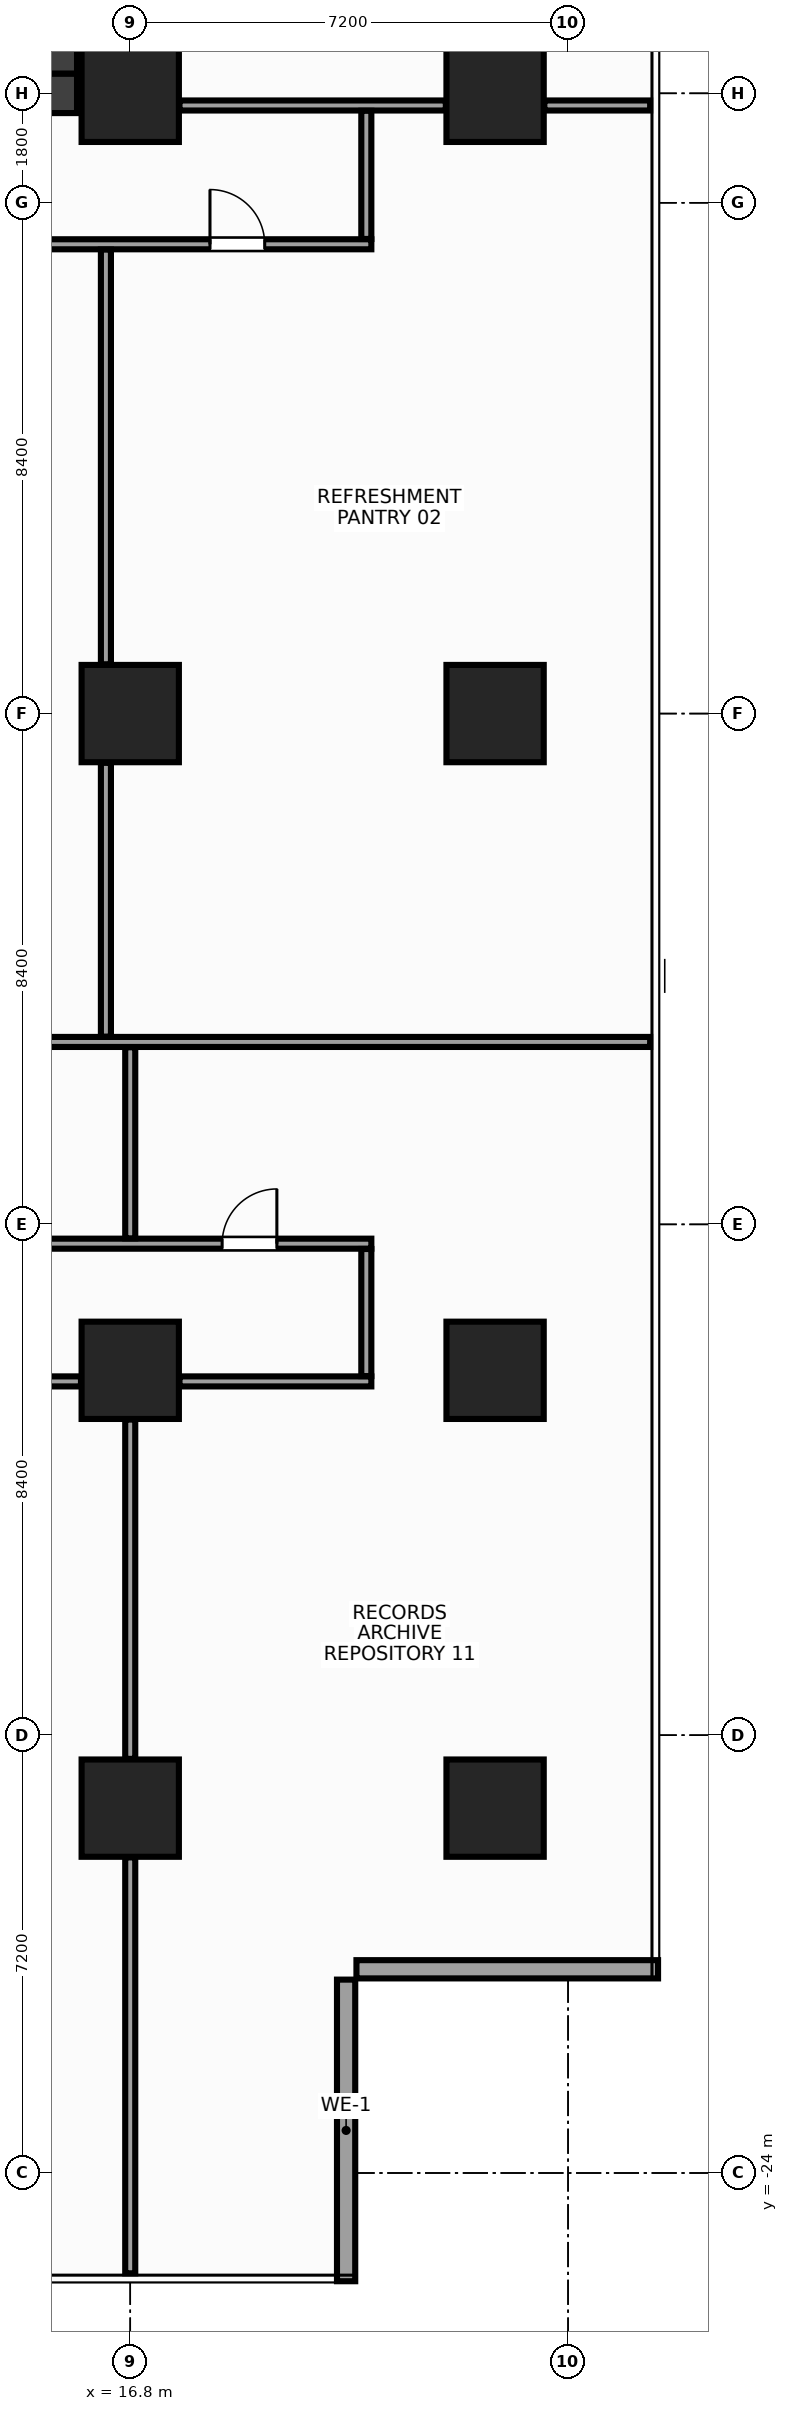
"""IFC4 building model, lengths in metres.
Left out: names, types, materials, properties, quantities, classifications, styles, units other than length and angle.
Written with IfcOpenShell. Run it as: python <this file> out.ifc"""

import sys

from ifc_helpers import new_model, si_unit, direction, frame, frame_2d, origin, origin_2d, place, context, subcontext, project, spatial, rectangle, extrude, source, transform, mapped, element, fill, save


model = new_model("IFC4")
c1 = context("Model", 3, precision=1e-05, world=origin(), true_north=direction((0.0, 1.0)))
c2 = subcontext(c1, "Body", "Model", "MODEL_VIEW")
j1 = project(units=[si_unit("LENGTHUNIT", "METRE"), si_unit("PLANEANGLEUNIT", "RADIAN")], contexts=[c1])
p1 = place(None, origin())
s1 = spatial("IfcSite", under=j1, at=p1, CompositionType="ELEMENT")
p2 = place(p1, origin())
s2 = spatial("IfcBuilding", under=s1, at=p2, CompositionType="ELEMENT")
p3 = place(p2, frame((0.0, 0.0, 110.0)))
s3 = spatial("IfcBuildingStorey", under=s2, at=p3, CompositionType="ELEMENT", Elevation=110.0)
m1 = source(origin(), c2, "Body", "SweptSolid", [
    extrude(rectangle(XDim=31.85, YDim=0.65, at=frame_2d((15.925, 0.0))), origin(), (0.0, 0.0, 1.0), 3.6),
])
p4 = place(p3, frame((-15.925, 10.2, 0.0), z_axis=(0.0, 0.0, 1.0), x_axis=(1.0, 0.0, 0.0)))
e1 = element("IfcWall", 1, at=p4, inside=s3, PredefinedType="SHEAR", context=c2, shape_type="MappedRepresentation", body=[
    mapped(m1, transform((0.0, 0.0, 0.0), x_axis=(1.0, 0.0, 0.0), y_axis=(0.0, 1.0, 0.0), z_axis=(0.0, 0.0, 1.0), scale=1.0)),
])
p5 = place(p4, frame((1.775, 0.0, 0.0)))
e2 = element("IfcOpeningElement", 2, at=p5, cuts=e1, PredefinedType="OPENING", context=c2, shape_type="SweptSolid", body=[
    extrude(rectangle(XDim=1.6, YDim=2.15, at=frame_2d((0.8, 1.075))), frame((0.0, 0.337, 0.0), z_axis=(0.0, -1.0, 0.0), x_axis=(1.0, 0.0, 0.0)), (0.0, 0.0, 1.0), 0.674),
])
p6 = place(p4, frame((28.475, 0.0, 0.0)))
e3 = element("IfcOpeningElement", 3, at=p6, cuts=e1, PredefinedType="OPENING", context=c2, shape_type="SweptSolid", body=[
    extrude(rectangle(XDim=1.6, YDim=2.15, at=frame_2d((0.8, 1.075))), frame((0.0, 0.337, 0.0), z_axis=(0.0, -1.0, 0.0), x_axis=(1.0, 0.0, 0.0)), (0.0, 0.0, 1.0), 0.674),
])
p7 = place(p4, frame((15.175, 0.0, 0.0)))
e4 = element("IfcOpeningElement", 4, at=p7, cuts=e1, PredefinedType="OPENING", context=c2, shape_type="SweptSolid", body=[
    extrude(rectangle(XDim=1.5, YDim=2.2, at=frame_2d((0.75, 1.1))), frame((0.0, 0.337, 0.0), z_axis=(0.0, -1.0, 0.0), x_axis=(1.0, 0.0, 0.0)), (0.0, 0.0, 1.0), 0.674),
])
m2 = source(origin(), c2, "Body", "SweptSolid", [
    extrude(rectangle(XDim=12.95, YDim=0.65, at=frame_2d((6.475, 0.0))), origin(), (0.0, 0.0, 1.0), 3.6),
])
p8 = place(p3, frame((15.6, 10.525, 0.0), z_axis=(0.0, 0.0, 1.0), x_axis=(0.0, 1.0, 0.0)))
e5 = element("IfcWall", 5, at=p8, inside=s3, PredefinedType="SHEAR", context=c2, shape_type="MappedRepresentation", body=[
    mapped(m2, transform((0.0, 0.0, 0.0), x_axis=(1.0, 0.0, 0.0), y_axis=(0.0, 1.0, 0.0), z_axis=(0.0, 0.0, 1.0), scale=1.0)),
])
m3 = source(origin(), c2, "Body", "SweptSolid", [
    extrude(rectangle(XDim=1.6, YDim=1.6, at=origin_2d()), origin(), (0.0, 0.0, 1.0), 3.6),
])
for number, where, z_axis, x_axis in (
    (6, (16.8, -18.0, 0.0), (0.0, 0.0, 1.0), (1.0, 0.0, 0.0)),
    (7, (16.8, -10.8, 0.0), (0.0, 0.0, 1.0), (1.0, 0.0, 0.0)),
    (8, (16.8, 0.0, 0.0), (0.0, 0.0, 1.0), (1.0, 0.0, 0.0)),
    (9, (16.8, 10.2, 0.0), (0.0, 0.0, 1.0), (1.0, 0.0, 0.0)),
    (10, (22.8, -18.0, 0.0), (0.0, 0.0, 1.0), (1.0, 0.0, 0.0)),
    (11, (22.8, -10.8, 0.0), (0.0, 0.0, 1.0), (1.0, 0.0, 0.0)),
    (12, (22.8, 0.0, 0.0), (0.0, 0.0, 1.0), (1.0, 0.0, 0.0)),
    (13, (22.8, 10.2, 0.0), (0.0, 0.0, 1.0), (1.0, 0.0, 0.0)),
):
    element("IfcColumn", number, at=place(p3, frame(where, z_axis=z_axis, x_axis=x_axis)), inside=s3, PredefinedType="COLUMN", context=c2, shape_type="MappedRepresentation", body=[
        mapped(m3, transform((0.0, 0.0, 0.0), x_axis=(1.0, 0.0, 0.0), y_axis=(0.0, 1.0, 0.0), z_axis=(0.0, 0.0, 1.0), scale=1.0)),
    ])
m4 = source(origin(), c2, "Body", "SweptSolid", [
    extrude(rectangle(XDim=4.96, YDim=0.3, at=frame_2d((2.48, 0.0))), origin(), (0.0, 0.0, 1.0), 2.74),
])
for number, where, z_axis, x_axis in (
    (14, (20.35, -25.78, 0.0), (0.0, 0.0, 1.0), (0.0, 1.0, 0.0)),
    (15, (20.52, -20.65, 0.0), (0.0, 0.0, 1.0), (1.0, 0.0, 0.0)),
):
    element("IfcWall", number, at=place(p3, frame(where, z_axis=z_axis, x_axis=x_axis)), inside=s3, PredefinedType="STANDARD", context=c2, shape_type="MappedRepresentation", body=[
        mapped(m4, transform((0.0, 0.0, 0.0), x_axis=(1.0, 0.0, 0.0), y_axis=(0.0, 1.0, 0.0), z_axis=(0.0, 0.0, 1.0), scale=1.0)),
    ])
m5 = source(origin(), c2, "Body", "SweptSolid", [
    extrude(rectangle(XDim=4.38, YDim=0.165, at=frame_2d((2.19, 0.0))), origin(), (0.0, 0.0, 1.0), 2.745),
])
p9 = place(p3, frame((17.61, 10.0, 0.0), z_axis=(0.0, 0.0, 1.0), x_axis=(1.0, 0.0, 0.0)))
e16 = element("IfcWall", 16, at=p9, inside=s3, PredefinedType="PARTITIONING", context=c2, shape_type="MappedRepresentation", body=[
    mapped(m5, transform((0.0, 0.0, 0.0), x_axis=(1.0, 0.0, 0.0), y_axis=(0.0, 1.0, 0.0), z_axis=(0.0, 0.0, 1.0), scale=1.0)),
])
m6 = source(origin(), c2, "Body", "SweptSolid", [
    extrude(rectangle(XDim=1.74, YDim=0.165, at=frame_2d((0.87, 0.0))), origin(), (0.0, 0.0, 1.0), 3.36),
])
p10 = place(p3, frame((23.61, 10.0, 0.0), z_axis=(0.0, 0.0, 1.0), x_axis=(1.0, 0.0, 0.0)))
e17 = element("IfcWall", 17, at=p10, inside=s3, PredefinedType="PARTITIONING", context=c2, shape_type="MappedRepresentation", body=[
    mapped(m6, transform((0.0, 0.0, 0.0), x_axis=(1.0, 0.0, 0.0), y_axis=(0.0, 1.0, 0.0), z_axis=(0.0, 0.0, 1.0), scale=1.0)),
])
m7 = source(origin(), c2, "Body", "SweptSolid", [
    extrude(rectangle(XDim=22.3, YDim=0.165, at=frame_2d((11.15, 0.0))), origin(), (0.0, 0.0, 1.0), 2.745),
])
p11 = place(p3, frame((-1.535, 7.718, 0.0), z_axis=(0.0, 0.0, 1.0), x_axis=(1.0, 0.0, 0.0)))
e18 = element("IfcWall", 18, at=p11, inside=s3, PredefinedType="PARTITIONING", context=c2, shape_type="MappedRepresentation", body=[
    mapped(m7, transform((0.0, 0.0, 0.0), x_axis=(1.0, 0.0, 0.0), y_axis=(0.0, 1.0, 0.0), z_axis=(0.0, 0.0, 1.0), scale=1.0)),
])
p12 = place(p11, frame((19.646, 0.0, 0.0)))
e19 = element("IfcOpeningElement", 19, at=p12, cuts=e18, PredefinedType="OPENING", context=c2, shape_type="SweptSolid", body=[
    extrude(rectangle(XDim=0.9, YDim=2.15, at=frame_2d((0.45, 1.075))), frame((0.0, 0.094, 0.0), z_axis=(0.0, -1.0, 0.0), x_axis=(1.0, 0.0, 0.0)), (0.0, 0.0, 1.0), 0.189),
])
p13 = place(p11, frame((2.236, 0.0, 0.0)))
e20 = element("IfcOpeningElement", 20, at=p13, cuts=e18, PredefinedType="OPENING", context=c2, shape_type="SweptSolid", body=[
    extrude(rectangle(XDim=0.9, YDim=2.15, at=frame_2d((0.45, 1.075))), frame((0.0, 0.094, 0.0), z_axis=(0.0, -1.0, 0.0), x_axis=(1.0, 0.0, 0.0)), (0.0, 0.0, 1.0), 0.189),
])
p14 = place(p11, frame((11.185, 0.0, 0.0)))
e21 = element("IfcOpeningElement", 21, at=p14, cuts=e18, PredefinedType="OPENING", context=c2, shape_type="SweptSolid", body=[
    extrude(rectangle(XDim=0.9, YDim=2.15, at=frame_2d((0.45, 1.075))), frame((0.0, 0.094, 0.0), z_axis=(0.0, -1.0, 0.0), x_axis=(1.0, 0.0, 0.0)), (0.0, 0.0, 1.0), 0.189),
])
p15 = place(p3, frame((-1.535, -8.718, 0.0), z_axis=(0.0, 0.0, 1.0), x_axis=(1.0, 0.0, 0.0)))
e22 = element("IfcWall", 22, at=p15, inside=s3, PredefinedType="PARTITIONING", context=c2, shape_type="MappedRepresentation", body=[
    mapped(m7, transform((0.0, 0.0, 0.0), x_axis=(1.0, 0.0, 0.0), y_axis=(0.0, 1.0, 0.0), z_axis=(0.0, 0.0, 1.0), scale=1.0)),
])
p16 = place(p15, frame((4.036, 0.0, 0.0)))
e23 = element("IfcOpeningElement", 23, at=p16, cuts=e22, PredefinedType="OPENING", context=c2, shape_type="SweptSolid", body=[
    extrude(rectangle(XDim=0.9, YDim=2.15, at=frame_2d((0.45, 1.075))), frame((0.0, 0.094, 0.0), z_axis=(0.0, -1.0, 0.0), x_axis=(1.0, 0.0, 0.0)), (0.0, 0.0, 1.0), 0.189),
])
p17 = place(p15, frame((13.185, 0.0, 0.0)))
e24 = element("IfcOpeningElement", 24, at=p17, cuts=e22, PredefinedType="OPENING", context=c2, shape_type="SweptSolid", body=[
    extrude(rectangle(XDim=0.9, YDim=2.15, at=frame_2d((0.45, 1.075))), frame((0.0, 0.094, 0.0), z_axis=(0.0, -1.0, 0.0), x_axis=(1.0, 0.0, 0.0)), (0.0, 0.0, 1.0), 0.189),
])
p18 = place(p15, frame((19.846, 0.0, 0.0)))
e25 = element("IfcOpeningElement", 25, at=p18, cuts=e22, PredefinedType="OPENING", context=c2, shape_type="SweptSolid", body=[
    extrude(rectangle(XDim=0.9, YDim=2.15, at=frame_2d((0.45, 1.075))), frame((0.0, 0.094, 0.0), z_axis=(0.0, -1.0, 0.0), x_axis=(1.0, 0.0, 0.0)), (0.0, 0.0, 1.0), 0.189),
])
m8 = source(origin(), c2, "Body", "SweptSolid", [
    extrude(rectangle(XDim=7.08, YDim=0.165, at=frame_2d((3.54, 0.0))), origin(), (0.0, 0.0, 1.0), 2.745),
])
p19 = place(p3, frame((8.91, -10.982, 0.0), z_axis=(0.0, 0.0, 1.0), x_axis=(1.0, 0.0, 0.0)))
e26 = element("IfcWall", 26, at=p19, inside=s3, PredefinedType="PARTITIONING", context=c2, shape_type="MappedRepresentation", body=[
    mapped(m8, transform((0.0, 0.0, 0.0), x_axis=(1.0, 0.0, 0.0), y_axis=(0.0, 1.0, 0.0), z_axis=(0.0, 0.0, 1.0), scale=1.0)),
])
p20 = place(p19, frame((3.09, 0.0, 0.0)))
e27 = element("IfcOpeningElement", 27, at=p20, cuts=e26, PredefinedType="OPENING", context=c2, shape_type="SweptSolid", body=[
    extrude(rectangle(XDim=0.9, YDim=2.15, at=frame_2d((0.45, 1.075))), frame((0.0, 0.094, 0.0), z_axis=(0.0, -1.0, 0.0), x_axis=(1.0, 0.0, 0.0)), (0.0, 0.0, 1.0), 0.189),
])
m9 = source(origin(), c2, "Body", "SweptSolid", [
    extrude(rectangle(XDim=3.155, YDim=0.165, at=frame_2d((1.577, 0.0))), origin(), (0.0, 0.0, 1.0), 2.745),
])
p21 = place(p3, frame((17.61, -10.982, 0.0), z_axis=(0.0, 0.0, 1.0), x_axis=(1.0, 0.0, 0.0)))
e28 = element("IfcWall", 28, at=p21, inside=s3, PredefinedType="PARTITIONING", context=c2, shape_type="MappedRepresentation", body=[
    mapped(m9, transform((0.0, 0.0, 0.0), x_axis=(1.0, 0.0, 0.0), y_axis=(0.0, 1.0, 0.0), z_axis=(0.0, 0.0, 1.0), scale=1.0)),
])
m10 = source(origin(), c2, "Body", "SweptSolid", [
    extrude(rectangle(XDim=2.108, YDim=0.165, at=frame_2d((1.054, 0.0))), origin(), (0.0, 0.0, 1.0), 3.36),
])
p22 = place(p3, frame((20.683, 7.805, 0.0), z_axis=(0.0, 0.0, 1.0), x_axis=(0.0, 1.0, 0.0)))
e29 = element("IfcWall", 29, at=p22, inside=s3, PredefinedType="PARTITIONING", context=c2, shape_type="MappedRepresentation", body=[
    mapped(m10, transform((0.0, 0.0, 0.0), x_axis=(1.0, 0.0, 0.0), y_axis=(0.0, 1.0, 0.0), z_axis=(0.0, 0.0, 1.0), scale=1.0)),
])
m11 = source(origin(), c2, "Body", "SweptSolid", [
    extrude(rectangle(XDim=2.09, YDim=0.165, at=frame_2d((1.045, 0.0))), origin(), (0.0, 0.0, 1.0), 3.36),
])
p23 = place(p3, frame((20.683, -10.895, 0.0), z_axis=(0.0, 0.0, 1.0), x_axis=(0.0, 1.0, 0.0)))
e30 = element("IfcWall", 30, at=p23, inside=s3, PredefinedType="PARTITIONING", context=c2, shape_type="MappedRepresentation", body=[
    mapped(m11, transform((0.0, 0.0, 0.0), x_axis=(1.0, 0.0, 0.0), y_axis=(0.0, 1.0, 0.0), z_axis=(0.0, 0.0, 1.0), scale=1.0)),
])
m12 = source(origin(), c2, "Body", "SweptSolid", [
    extrude(rectangle(XDim=26.88, YDim=0.165, at=frame_2d((13.44, 0.0))), origin(), (0.0, 0.0, 1.0), 2.745),
])
p24 = place(p3, frame((-1.53, -5.4, 0.0), z_axis=(0.0, 0.0, 1.0), x_axis=(1.0, 0.0, 0.0)))
e31 = element("IfcWall", 31, at=p24, inside=s3, PredefinedType="PARTITIONING", context=c2, shape_type="MappedRepresentation", body=[
    mapped(m12, transform((0.0, 0.0, 0.0), x_axis=(1.0, 0.0, 0.0), y_axis=(0.0, 1.0, 0.0), z_axis=(0.0, 0.0, 1.0), scale=1.0)),
])
m13 = source(origin(), c2, "Body", "SweptSolid", [
    extrude(rectangle(XDim=4.502, YDim=0.165, at=frame_2d((2.251, 0.0))), origin(), (0.0, 0.0, 1.0), 3.36),
])
p25 = place(p3, frame((16.4, -5.312, 0.0), z_axis=(0.0, 0.0, 1.0), x_axis=(0.0, 1.0, 0.0)))
e32 = element("IfcWall", 32, at=p25, inside=s3, PredefinedType="PARTITIONING", context=c2, shape_type="MappedRepresentation", body=[
    mapped(m13, transform((0.0, 0.0, 0.0), x_axis=(1.0, 0.0, 0.0), y_axis=(0.0, 1.0, 0.0), z_axis=(0.0, 0.0, 1.0), scale=1.0)),
])
m14 = source(origin(), c2, "Body", "SweptSolid", [
    extrude(rectangle(XDim=6.82, YDim=0.165, at=frame_2d((3.41, 0.0))), origin(), (0.0, 0.0, 1.0), 2.645),
])
p26 = place(p3, frame((16.4, 0.81, 0.0), z_axis=(0.0, 0.0, 1.0), x_axis=(0.0, 1.0, 0.0)))
e33 = element("IfcWall", 33, at=p26, inside=s3, PredefinedType="PARTITIONING", context=c2, shape_type="MappedRepresentation", body=[
    mapped(m14, transform((0.0, 0.0, 0.0), x_axis=(1.0, 0.0, 0.0), y_axis=(0.0, 1.0, 0.0), z_axis=(0.0, 0.0, 1.0), scale=1.0)),
])
m15 = source(origin(), c2, "Body", "SweptSolid", [
    extrude(rectangle(XDim=6.84, YDim=0.165, at=frame_2d((3.42, 0.0))), origin(), (0.0, 0.0, 1.0), 3.36),
])
p27 = place(p3, frame((16.8, -25.65, 0.0), z_axis=(0.0, 0.0, 1.0), x_axis=(0.0, 1.0, 0.0)))
e34 = element("IfcWall", 34, at=p27, inside=s3, PredefinedType="PARTITIONING", context=c2, shape_type="MappedRepresentation", body=[
    mapped(m15, transform((0.0, 0.0, 0.0), x_axis=(1.0, 0.0, 0.0), y_axis=(0.0, 1.0, 0.0), z_axis=(0.0, 0.0, 1.0), scale=1.0)),
])
m16 = source(origin(), c2, "Body", "SweptSolid", [
    extrude(rectangle(XDim=5.58, YDim=0.165, at=frame_2d((2.79, 0.0))), origin(), (0.0, 0.0, 1.0), 2.945),
])
p28 = place(p3, frame((16.8, -17.19, 0.0), z_axis=(0.0, 0.0, 1.0), x_axis=(0.0, 1.0, 0.0)))
e35 = element("IfcWall", 35, at=p28, inside=s3, PredefinedType="PARTITIONING", context=c2, shape_type="MappedRepresentation", body=[
    mapped(m16, transform((0.0, 0.0, 0.0), x_axis=(1.0, 0.0, 0.0), y_axis=(0.0, 1.0, 0.0), z_axis=(0.0, 0.0, 1.0), scale=1.0)),
])
m17 = source(origin(), c2, "Body", "SweptSolid", [
    extrude(rectangle(XDim=3.142, YDim=0.165, at=frame_2d((1.571, 0.0))), origin(), (0.0, 0.0, 1.0), 2.745),
])
p29 = place(p3, frame((16.8, -8.63, 0.0), z_axis=(0.0, 0.0, 1.0), x_axis=(0.0, 1.0, 0.0)))
e36 = element("IfcWall", 36, at=p29, inside=s3, PredefinedType="PARTITIONING", context=c2, shape_type="MappedRepresentation", body=[
    mapped(m17, transform((0.0, 0.0, 0.0), x_axis=(1.0, 0.0, 0.0), y_axis=(0.0, 1.0, 0.0), z_axis=(0.0, 0.0, 1.0), scale=1.0)),
])
m18 = source(origin(), c2, "Body", "SweptSolid", [
    extrude(rectangle(XDim=0.9, YDim=2.15, at=frame_2d((0.45, 1.075))), frame((0.0, 0.025, 0.0), z_axis=(0.0, -1.0, 0.0), x_axis=(1.0, 0.0, 0.0)), (0.0, 0.0, 1.0), 0.05),
])
p30 = place(p12, origin())
e37 = element("IfcDoor", 37, at=p30, inside=s3, OperationType="SINGLE_SWING_LEFT", PredefinedType="DOOR", context=c2, shape_type="MappedRepresentation", body=[
    mapped(m18, transform((0.0, 0.0, 0.0), x_axis=(1.0, 0.0, 0.0), y_axis=(0.0, 1.0, 0.0), z_axis=(0.0, 0.0, 1.0), scale=1.0)),
])
fill(e19, e37)
p31 = place(p18, origin())
e38 = element("IfcDoor", 38, at=p31, inside=s3, OperationType="SINGLE_SWING_RIGHT", PredefinedType="DOOR", context=c2, shape_type="MappedRepresentation", body=[
    mapped(m18, transform((0.0, 0.0, 0.0), x_axis=(1.0, 0.0, 0.0), y_axis=(0.0, 1.0, 0.0), z_axis=(0.0, 0.0, 1.0), scale=1.0)),
])
fill(e25, e38)
save(model, sys.argv[1])
